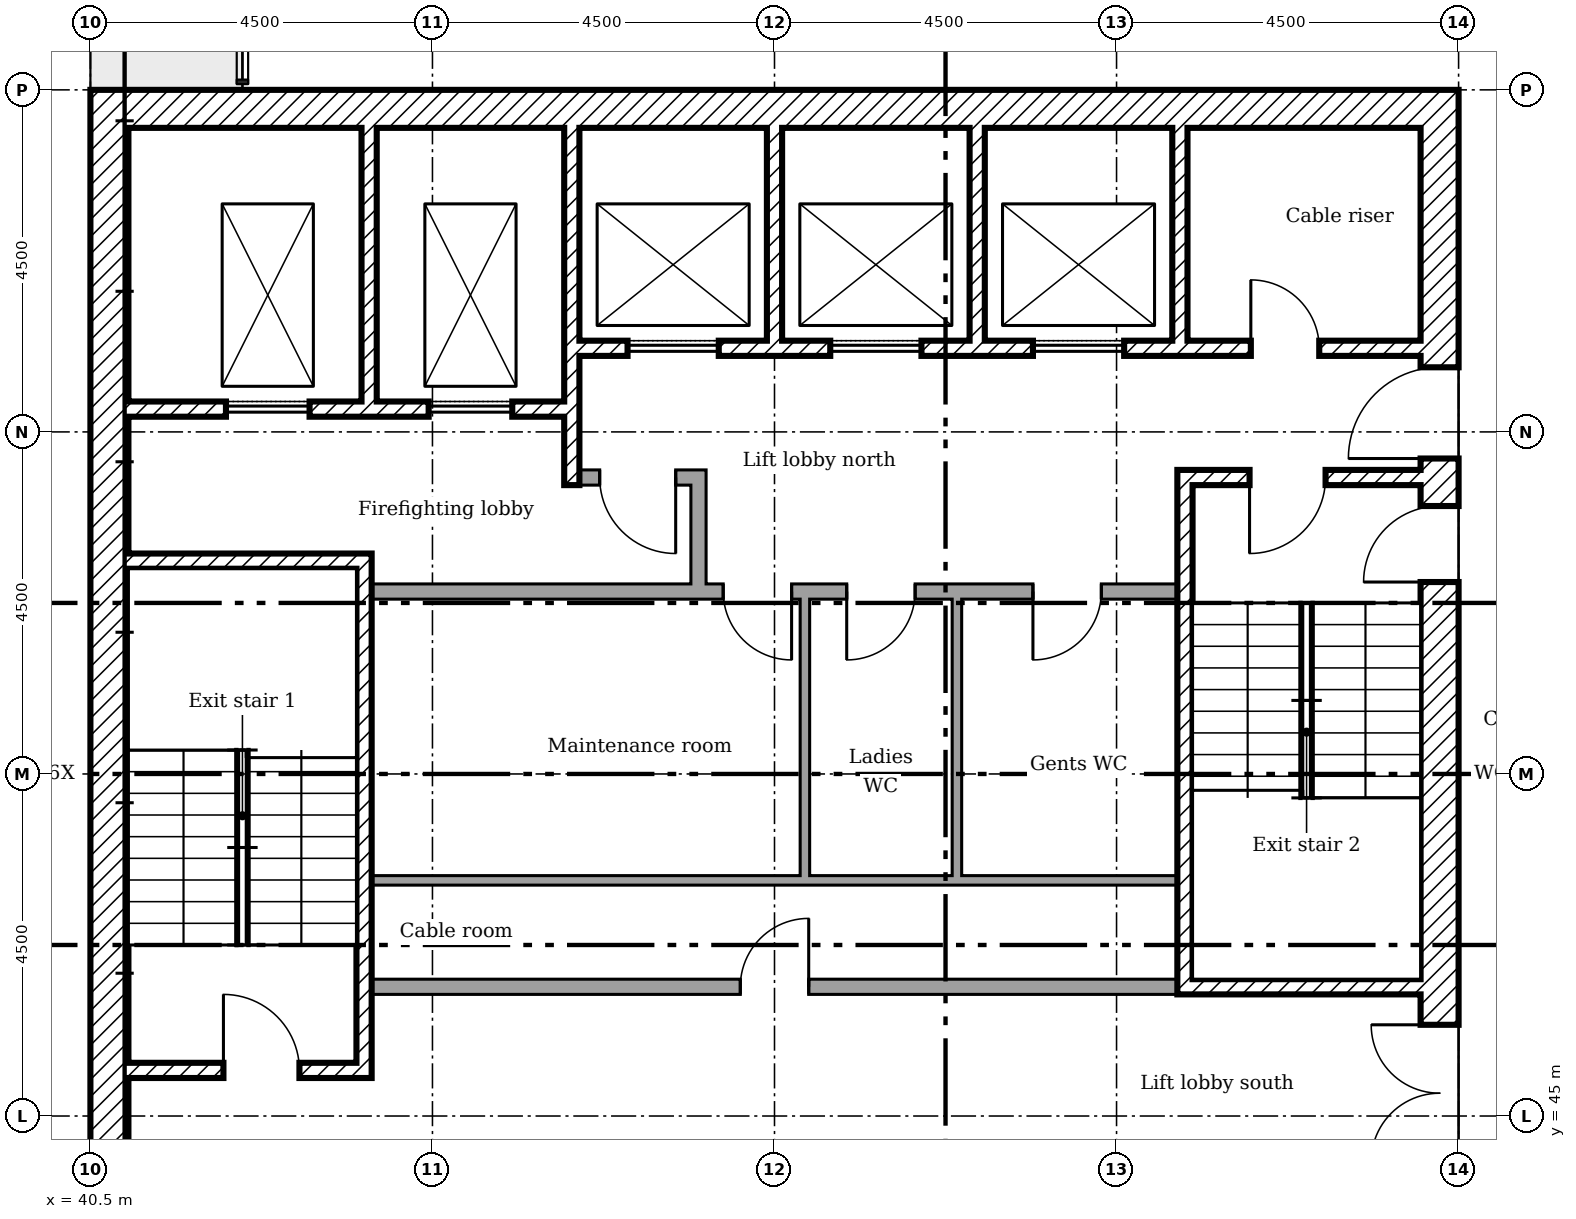
"""IFC4 building model, lengths in metres.
Left out: names, types, materials, properties, quantities, classifications, styles, units other than length and angle.
Written with IfcOpenShell. Run it as: python <this file> out.ifc"""

import sys

from ifc_helpers import new_model, si_unit, direction, frame, frame_2d, origin, place, context, subcontext, project, spatial, rectangle, extrude, element, fill, save


model = new_model("IFC4")
c1 = context("Model", 3, precision=1e-05, world=origin(), true_north=direction((0.0, 1.0)))
c2 = subcontext(c1, "Body", "Model", "MODEL_VIEW")
j1 = project(units=[si_unit("LENGTHUNIT", "METRE"), si_unit("PLANEANGLEUNIT", "RADIAN")], contexts=[c1])
p1 = place(None, origin())
s1 = spatial("IfcSite", under=j1, at=p1, CompositionType="ELEMENT")
p2 = place(p1, origin())
s2 = spatial("IfcBuilding", under=s1, at=p2, CompositionType="ELEMENT")
p3 = place(p2, frame((0.0, 0.0, 242.4)))
s3 = spatial("IfcBuildingStorey", under=s2, at=p3, CompositionType="ELEMENT", Elevation=242.4)
p4 = place(p3, frame((58.25, 40.5, 0.0), z_axis=(0.0, 0.0, 1.0), x_axis=(0.0, 1.0, 0.0)))
e1 = element("IfcWall", 1, at=p4, inside=s3, PredefinedType="SHEAR", context=c2, shape_type="SweptSolid", body=[
    extrude(rectangle(XDim=18.0, YDim=0.5, at=frame_2d((9.0, 0.0))), origin(), (0.0, 0.0, 1.0), 3.3),
])
p5 = place(p4, frame((13.15, 0.0, 0.0)))
e2 = element("IfcOpeningElement", 2, at=p5, cuts=e1, PredefinedType="OPENING", context=c2, shape_type="SweptSolid", body=[
    extrude(rectangle(XDim=1.2, YDim=2.1, at=frame_2d((0.6, 1.05))), frame((0.0, 0.26, 0.0), z_axis=(0.0, -1.0, 0.0), x_axis=(1.0, 0.0, 0.0)), (0.0, 0.0, 1.0), 0.52),
])
p6 = place(p4, frame((3.9, 0.0, 0.0)))
e3 = element("IfcOpeningElement", 3, at=p6, cuts=e1, PredefinedType="OPENING", context=c2, shape_type="SweptSolid", body=[
    extrude(rectangle(XDim=1.8, YDim=2.1, at=frame_2d((0.9, 1.05))), frame((0.0, 0.26, 0.0), z_axis=(0.0, -1.0, 0.0), x_axis=(1.0, 0.0, 0.0)), (0.0, 0.0, 1.0), 0.52),
])
p7 = place(p4, frame((11.525, 0.0, 0.0)))
e4 = element("IfcOpeningElement", 4, at=p7, cuts=e1, PredefinedType="OPENING", context=c2, shape_type="SweptSolid", body=[
    extrude(rectangle(XDim=1.0, YDim=2.1, at=frame_2d((0.5, 1.05))), frame((0.0, 0.26, 0.0), z_axis=(0.0, -1.0, 0.0), x_axis=(1.0, 0.0, 0.0)), (0.0, 0.0, 1.0), 0.52),
])
p8 = place(p3, frame((40.5, 58.25, 0.0)))
e5 = element("IfcWall", 5, at=p8, inside=s3, PredefinedType="SHEAR", context=c2, shape_type="SweptSolid", body=[
    extrude(rectangle(XDim=17.5, YDim=0.5, at=frame_2d((8.75, 0.0))), origin(), (0.0, 0.0, 1.0), 3.3),
])
p9 = place(p3, frame((40.75, 41.0, 0.0), z_axis=(0.0, 0.0, 1.0), x_axis=(0.0, 1.0, 0.0)))
e6 = element("IfcWall", 6, at=p9, inside=s3, PredefinedType="SHEAR", context=c2, shape_type="SweptSolid", body=[
    extrude(rectangle(XDim=17.0, YDim=0.5, at=frame_2d((8.5, 0.0))), origin(), (0.0, 0.0, 1.0), 3.3),
])
p10 = place(p3, frame((44.167, 58.0, 0.0), z_axis=(0.0, 0.0, 1.0), x_axis=(0.0, -1.0, 0.0)))
e7 = element("IfcWall", 7, at=p10, inside=s3, PredefinedType="SHEAR", context=c2, shape_type="SweptSolid", body=[
    extrude(rectangle(XDim=3.6, YDim=0.2, at=frame_2d((1.8, 0.0))), origin(), (0.0, 0.0, 1.0), 3.3),
])
p11 = place(p3, frame((46.833, 58.0, 0.0), z_axis=(0.0, 0.0, 1.0), x_axis=(0.0, -1.0, 0.0)))
e8 = element("IfcWall", 8, at=p11, inside=s3, PredefinedType="SHEAR", context=c2, shape_type="SweptSolid", body=[
    extrude(rectangle(XDim=4.7, YDim=0.2, at=frame_2d((2.35, 0.0))), origin(), (0.0, 0.0, 1.0), 3.3),
])
for number, where, z_axis, x_axis in (
    (9, (49.5, 58.0, 0.0), (0.0, 0.0, 1.0), (0.0, -1.0, 0.0)),
    (10, (52.167, 58.0, 0.0), (0.0, 0.0, 1.0), (0.0, -1.0, 0.0)),
    (11, (54.833, 58.0, 0.0), (0.0, 0.0, 1.0), (0.0, -1.0, 0.0)),
):
    element("IfcWall", number, at=place(p3, frame(where, z_axis=z_axis, x_axis=x_axis)), inside=s3, PredefinedType="SHEAR", context=c2, shape_type="SweptSolid", body=[
        extrude(rectangle(XDim=2.8, YDim=0.2, at=frame_2d((1.4, 0.0))), origin(), (0.0, 0.0, 1.0), 3.3),
    ])
p12 = place(p3, frame((48.5, 51.9, 0.0), z_axis=(0.0, 0.0, 1.0), x_axis=(0.0, 1.0, 0.0)))
e12 = element("IfcWall", 12, at=p12, inside=s3, PredefinedType="PARTITIONING", context=c2, shape_type="SweptSolid", body=[
    extrude(rectangle(XDim=1.6, YDim=0.2, at=frame_2d((0.8, 0.0))), origin(), (0.0, 0.0, 1.0), 3.3),
])
p13 = place(p3, frame((46.933, 53.4, 0.0)))
e13 = element("IfcWall", 13, at=p13, inside=s3, PredefinedType="PARTITIONING", context=c2, shape_type="SweptSolid", body=[
    extrude(rectangle(XDim=1.467, YDim=0.2, at=frame_2d((0.733, 0.0))), origin(), (0.0, 0.0, 1.0), 3.3),
])
p14 = place(p13, frame((0.267, 0.0, 0.0)))
e14 = element("IfcOpeningElement", 14, at=p14, cuts=e13, PredefinedType="OPENING", context=c2, shape_type="SweptSolid", body=[
    extrude(rectangle(XDim=1.0, YDim=2.1, at=frame_2d((0.5, 1.05))), frame((0.0, 0.11, 0.0), z_axis=(0.0, -1.0, 0.0), x_axis=(1.0, 0.0, 0.0)), (0.0, 0.0, 1.0), 0.22),
])
p15 = place(p3, frame((46.933, 55.1, 0.0)))
e15 = element("IfcWall", 15, at=p15, inside=s3, PredefinedType="SHEAR", context=c2, shape_type="SweptSolid", body=[
    extrude(rectangle(XDim=11.067, YDim=0.2, at=frame_2d((5.533, 0.0))), origin(), (0.0, 0.0, 1.0), 3.3),
])
p16 = place(p15, frame((8.833, 0.0, 0.0)))
e16 = element("IfcOpeningElement", 16, at=p16, cuts=e15, PredefinedType="OPENING", context=c2, shape_type="SweptSolid", body=[
    extrude(rectangle(XDim=0.9, YDim=2.1, at=frame_2d((0.45, 1.05))), frame((0.0, 0.11, 0.0), z_axis=(0.0, -1.0, 0.0), x_axis=(1.0, 0.0, 0.0)), (0.0, 0.0, 1.0), 0.22),
])
p17 = place(p15, frame((0.633, 0.0, 0.0)))
e17 = element("IfcOpeningElement", 17, at=p17, cuts=e15, PredefinedType="OPENING", context=c2, shape_type="SweptSolid", body=[
    extrude(rectangle(XDim=1.2, YDim=2.1, at=frame_2d((0.6, 1.05))), frame((0.0, 0.11, 0.0), z_axis=(0.0, -1.0, 0.0), x_axis=(1.0, 0.0, 0.0)), (0.0, 0.0, 1.0), 0.22),
])
p18 = place(p15, frame((3.3, 0.0, 0.0)))
e18 = element("IfcOpeningElement", 18, at=p18, cuts=e15, PredefinedType="OPENING", context=c2, shape_type="SweptSolid", body=[
    extrude(rectangle(XDim=1.2, YDim=2.1, at=frame_2d((0.6, 1.05))), frame((0.0, 0.11, 0.0), z_axis=(0.0, -1.0, 0.0), x_axis=(1.0, 0.0, 0.0)), (0.0, 0.0, 1.0), 0.22),
])
p19 = place(p15, frame((5.967, 0.0, 0.0)))
e19 = element("IfcOpeningElement", 19, at=p19, cuts=e15, PredefinedType="OPENING", context=c2, shape_type="SweptSolid", body=[
    extrude(rectangle(XDim=1.2, YDim=2.1, at=frame_2d((0.6, 1.05))), frame((0.0, 0.11, 0.0), z_axis=(0.0, -1.0, 0.0), x_axis=(1.0, 0.0, 0.0)), (0.0, 0.0, 1.0), 0.22),
])
p20 = place(p3, frame((41.0, 54.3, 0.0)))
e20 = element("IfcWall", 20, at=p20, inside=s3, PredefinedType="SHEAR", context=c2, shape_type="SweptSolid", body=[
    extrude(rectangle(XDim=5.733, YDim=0.2, at=frame_2d((2.867, 0.0))), origin(), (0.0, 0.0, 1.0), 3.3),
])
p21 = place(p20, frame((1.283, 0.0, 0.0)))
e21 = element("IfcOpeningElement", 21, at=p21, cuts=e20, PredefinedType="OPENING", context=c2, shape_type="SweptSolid", body=[
    extrude(rectangle(XDim=1.1, YDim=2.1, at=frame_2d((0.55, 1.05))), frame((0.0, 0.11, 0.0), z_axis=(0.0, -1.0, 0.0), x_axis=(1.0, 0.0, 0.0)), (0.0, 0.0, 1.0), 0.22),
])
p22 = place(p20, frame((3.95, 0.0, 0.0)))
e22 = element("IfcOpeningElement", 22, at=p22, cuts=e20, PredefinedType="OPENING", context=c2, shape_type="SweptSolid", body=[
    extrude(rectangle(XDim=1.1, YDim=2.1, at=frame_2d((0.55, 1.05))), frame((0.0, 0.11, 0.0), z_axis=(0.0, -1.0, 0.0), x_axis=(1.0, 0.0, 0.0)), (0.0, 0.0, 1.0), 0.22),
])
p23 = place(p3, frame((44.1, 45.5, 0.0), z_axis=(0.0, 0.0, 1.0), x_axis=(0.0, 1.0, 0.0)))
e23 = element("IfcWall", 23, at=p23, inside=s3, PredefinedType="SHEAR", context=c2, shape_type="SweptSolid", body=[
    extrude(rectangle(XDim=6.9, YDim=0.2, at=frame_2d((3.45, 0.0))), origin(), (0.0, 0.0, 1.0), 3.3),
])
p24 = place(p3, frame((41.0, 52.3, 0.0)))
e24 = element("IfcWall", 24, at=p24, inside=s3, PredefinedType="SHEAR", context=c2, shape_type="SweptSolid", body=[
    extrude(rectangle(XDim=3.0, YDim=0.2, at=frame_2d((1.5, 0.0))), origin(), (0.0, 0.0, 1.0), 3.3),
])
p25 = place(p3, frame((41.0, 45.6, 0.0)))
e25 = element("IfcWall", 25, at=p25, inside=s3, PredefinedType="SHEAR", context=c2, shape_type="SweptSolid", body=[
    extrude(rectangle(XDim=3.0, YDim=0.2, at=frame_2d((1.5, 0.0))), origin(), (0.0, 0.0, 1.0), 3.3),
])
p26 = place(p25, frame((1.25, 0.0, 0.0)))
e26 = element("IfcOpeningElement", 26, at=p26, cuts=e25, PredefinedType="OPENING", context=c2, shape_type="SweptSolid", body=[
    extrude(rectangle(XDim=1.0, YDim=2.1, at=frame_2d((0.5, 1.05))), frame((0.0, 0.11, 0.0), z_axis=(0.0, -1.0, 0.0), x_axis=(1.0, 0.0, 0.0)), (0.0, 0.0, 1.0), 0.22),
])
p27 = place(p3, frame((54.8, 53.4, 0.0)))
e27 = element("IfcWall", 27, at=p27, inside=s3, PredefinedType="SHEAR", context=c2, shape_type="SweptSolid", body=[
    extrude(rectangle(XDim=3.2, YDim=0.2, at=frame_2d((1.6, 0.0))), origin(), (0.0, 0.0, 1.0), 3.3),
])
p28 = place(p27, frame((0.95, 0.0, 0.0)))
e28 = element("IfcOpeningElement", 28, at=p28, cuts=e27, PredefinedType="OPENING", context=c2, shape_type="SweptSolid", body=[
    extrude(rectangle(XDim=1.0, YDim=2.1, at=frame_2d((0.5, 1.05))), frame((0.0, 0.11, 0.0), z_axis=(0.0, -1.0, 0.0), x_axis=(1.0, 0.0, 0.0)), (0.0, 0.0, 1.0), 0.22),
])
p29 = place(p3, frame((54.8, 46.7, 0.0)))
e29 = element("IfcWall", 29, at=p29, inside=s3, PredefinedType="SHEAR", context=c2, shape_type="SweptSolid", body=[
    extrude(rectangle(XDim=3.2, YDim=0.2, at=frame_2d((1.6, 0.0))), origin(), (0.0, 0.0, 1.0), 3.3),
])
p30 = place(p3, frame((54.9, 46.8, 0.0), z_axis=(0.0, 0.0, 1.0), x_axis=(0.0, 1.0, 0.0)))
e30 = element("IfcWall", 30, at=p30, inside=s3, PredefinedType="SHEAR", context=c2, shape_type="SweptSolid", body=[
    extrude(rectangle(XDim=6.5, YDim=0.2, at=frame_2d((3.25, 0.0))), origin(), (0.0, 0.0, 1.0), 3.3),
])
p31 = place(p3, frame((44.2, 51.9, 0.0)))
e31 = element("IfcWall", 31, at=p31, inside=s3, PredefinedType="PARTITIONING", context=c2, shape_type="SweptSolid", body=[
    extrude(rectangle(XDim=10.6, YDim=0.2, at=frame_2d((5.3, 0.0))), origin(), (0.0, 0.0, 1.0), 3.3),
])
p32 = place(p31, frame((4.625, 0.0, 0.0)))
e32 = element("IfcOpeningElement", 32, at=p32, cuts=e31, PredefinedType="OPENING", context=c2, shape_type="SweptSolid", body=[
    extrude(rectangle(XDim=0.9, YDim=2.1, at=frame_2d((0.45, 1.05))), frame((0.0, 0.11, 0.0), z_axis=(0.0, -1.0, 0.0), x_axis=(1.0, 0.0, 0.0)), (0.0, 0.0, 1.0), 0.22),
])
p33 = place(p31, frame((6.25, 0.0, 0.0)))
e33 = element("IfcOpeningElement", 33, at=p33, cuts=e31, PredefinedType="OPENING", context=c2, shape_type="SweptSolid", body=[
    extrude(rectangle(XDim=0.9, YDim=2.1, at=frame_2d((0.45, 1.05))), frame((0.0, 0.11, 0.0), z_axis=(0.0, -1.0, 0.0), x_axis=(1.0, 0.0, 0.0)), (0.0, 0.0, 1.0), 0.22),
])
p34 = place(p31, frame((8.7, 0.0, 0.0)))
e34 = element("IfcOpeningElement", 34, at=p34, cuts=e31, PredefinedType="OPENING", context=c2, shape_type="SweptSolid", body=[
    extrude(rectangle(XDim=0.9, YDim=2.1, at=frame_2d((0.45, 1.05))), frame((0.0, 0.11, 0.0), z_axis=(0.0, -1.0, 0.0), x_axis=(1.0, 0.0, 0.0)), (0.0, 0.0, 1.0), 0.22),
])
p35 = place(p3, frame((44.2, 46.7, 0.0)))
e35 = element("IfcWall", 35, at=p35, inside=s3, PredefinedType="PARTITIONING", context=c2, shape_type="SweptSolid", body=[
    extrude(rectangle(XDim=10.6, YDim=0.2, at=frame_2d((5.3, 0.0))), origin(), (0.0, 0.0, 1.0), 3.3),
])
p36 = place(p35, frame((4.85, 0.0, 0.0)))
e36 = element("IfcOpeningElement", 36, at=p36, cuts=e35, PredefinedType="OPENING", context=c2, shape_type="SweptSolid", body=[
    extrude(rectangle(XDim=0.9, YDim=2.1, at=frame_2d((0.45, 1.05))), frame((0.0, 0.11, 0.0), z_axis=(0.0, -1.0, 0.0), x_axis=(1.0, 0.0, 0.0)), (0.0, 0.0, 1.0), 0.22),
])
p37 = place(p3, frame((49.962, 48.1, 0.0), z_axis=(0.0, 0.0, 1.0), x_axis=(-1.0, 0.0, 0.0)))
e37 = element("IfcWall", 37, at=p37, inside=s3, PredefinedType="PARTITIONING", context=c2, shape_type="SweptSolid", body=[
    extrude(rectangle(XDim=5.762, YDim=0.125, at=frame_2d((2.881, 0.0))), origin(), (0.0, 0.0, 1.0), 3.3),
])
p38 = place(p3, frame((51.962, 48.1, 0.0), z_axis=(0.0, 0.0, 1.0), x_axis=(-1.0, 0.0, 0.0)))
e38 = element("IfcWall", 38, at=p38, inside=s3, PredefinedType="PARTITIONING", context=c2, shape_type="SweptSolid", body=[
    extrude(rectangle(XDim=2.062, YDim=0.125, at=frame_2d((1.031, 0.0))), origin(), (0.0, 0.0, 1.0), 3.3),
])
p39 = place(p3, frame((49.9, 48.163, 0.0), z_axis=(0.0, 0.0, 1.0), x_axis=(0.0, 1.0, 0.0)))
e39 = element("IfcWall", 39, at=p39, inside=s3, PredefinedType="PARTITIONING", context=c2, shape_type="SweptSolid", body=[
    extrude(rectangle(XDim=3.637, YDim=0.125, at=frame_2d((1.819, 0.0))), origin(), (0.0, 0.0, 1.0), 3.3),
])
p40 = place(p3, frame((54.8, 48.1, 0.0), z_axis=(0.0, 0.0, 1.0), x_axis=(-1.0, 0.0, 0.0)))
e40 = element("IfcWall", 40, at=p40, inside=s3, PredefinedType="PARTITIONING", context=c2, shape_type="SweptSolid", body=[
    extrude(rectangle(XDim=2.9, YDim=0.125, at=frame_2d((1.45, 0.0))), origin(), (0.0, 0.0, 1.0), 3.3),
])
p41 = place(p3, frame((51.9, 48.163, 0.0), z_axis=(0.0, 0.0, 1.0), x_axis=(0.0, 1.0, 0.0)))
e41 = element("IfcWall", 41, at=p41, inside=s3, PredefinedType="PARTITIONING", context=c2, shape_type="SweptSolid", body=[
    extrude(rectangle(XDim=3.637, YDim=0.125, at=frame_2d((1.819, 0.0))), origin(), (0.0, 0.0, 1.0), 3.3),
])
p42 = place(p5, origin())
e42 = element("IfcDoor", 42, at=p42, inside=s3, OperationType="SINGLE_SWING_RIGHT", PredefinedType="DOOR", context=c2, shape_type="SweptSolid", body=[
    extrude(rectangle(XDim=1.2, YDim=2.1, at=frame_2d((0.6, 1.05))), frame((0.0, 0.025, 0.0), z_axis=(0.0, -1.0, 0.0), x_axis=(1.0, 0.0, 0.0)), (0.0, 0.0, 1.0), 0.05),
])
fill(e2, e42)
p43 = place(p6, origin())
e43 = element("IfcDoor", 43, at=p43, inside=s3, OperationType="DOUBLE_DOOR_SINGLE_SWING", PredefinedType="DOOR", context=c2, shape_type="SweptSolid", body=[
    extrude(rectangle(XDim=1.8, YDim=2.1, at=frame_2d((0.9, 1.05))), frame((0.0, 0.025, 0.0), z_axis=(0.0, -1.0, 0.0), x_axis=(1.0, 0.0, 0.0)), (0.0, 0.0, 1.0), 0.05),
])
fill(e3, e43)
p44 = place(p26, origin())
e44 = element("IfcDoor", 44, at=p44, inside=s3, OperationType="SINGLE_SWING_RIGHT", PredefinedType="DOOR", context=c2, shape_type="SweptSolid", body=[
    extrude(rectangle(XDim=1.0, YDim=2.1, at=frame_2d((0.5, 1.05))), frame((0.0, 0.025, 0.0), z_axis=(0.0, -1.0, 0.0), x_axis=(1.0, 0.0, 0.0)), (0.0, 0.0, 1.0), 0.05),
])
fill(e26, e44)
p45 = place(p28, frame((1.0, 0.0, 0.0), x_axis=(-1.0, 0.0, 0.0)))
e45 = element("IfcDoor", 45, at=p45, inside=s3, OperationType="SINGLE_SWING_LEFT", PredefinedType="DOOR", context=c2, shape_type="SweptSolid", body=[
    extrude(rectangle(XDim=1.0, YDim=2.1, at=frame_2d((0.5, 1.05))), frame((0.0, 0.025, 0.0), z_axis=(0.0, -1.0, 0.0), x_axis=(1.0, 0.0, 0.0)), (0.0, 0.0, 1.0), 0.05),
])
fill(e28, e45)
p46 = place(p7, origin())
e46 = element("IfcDoor", 46, at=p46, inside=s3, OperationType="SINGLE_SWING_RIGHT", PredefinedType="DOOR", context=c2, shape_type="SweptSolid", body=[
    extrude(rectangle(XDim=1.0, YDim=2.1, at=frame_2d((0.5, 1.05))), frame((0.0, 0.025, 0.0), z_axis=(0.0, -1.0, 0.0), x_axis=(1.0, 0.0, 0.0)), (0.0, 0.0, 1.0), 0.05),
])
fill(e4, e46)
p47 = place(p14, frame((1.0, 0.0, 0.0), x_axis=(-1.0, 0.0, 0.0)))
e47 = element("IfcDoor", 47, at=p47, inside=s3, OperationType="SINGLE_SWING_RIGHT", PredefinedType="DOOR", context=c2, shape_type="SweptSolid", body=[
    extrude(rectangle(XDim=1.0, YDim=2.1, at=frame_2d((0.5, 1.05))), frame((0.0, 0.025, 0.0), z_axis=(0.0, -1.0, 0.0), x_axis=(1.0, 0.0, 0.0)), (0.0, 0.0, 1.0), 0.05),
])
fill(e14, e47)
p48 = place(p16, origin())
e48 = element("IfcDoor", 48, at=p48, inside=s3, OperationType="SINGLE_SWING_RIGHT", PredefinedType="DOOR", context=c2, shape_type="SweptSolid", body=[
    extrude(rectangle(XDim=0.9, YDim=2.1, at=frame_2d((0.45, 1.05))), frame((0.0, 0.025, 0.0), z_axis=(0.0, -1.0, 0.0), x_axis=(1.0, 0.0, 0.0)), (0.0, 0.0, 1.0), 0.05),
])
fill(e16, e48)
p49 = place(p36, origin())
e49 = element("IfcDoor", 49, at=p49, inside=s3, OperationType="SINGLE_SWING_LEFT", PredefinedType="DOOR", context=c2, shape_type="SweptSolid", body=[
    extrude(rectangle(XDim=0.9, YDim=2.1, at=frame_2d((0.45, 1.05))), frame((0.0, 0.025, 0.0), z_axis=(0.0, -1.0, 0.0), x_axis=(1.0, 0.0, 0.0)), (0.0, 0.0, 1.0), 0.05),
])
fill(e36, e49)
p50 = place(p32, frame((0.9, 0.0, 0.0), x_axis=(-1.0, 0.0, 0.0)))
e50 = element("IfcDoor", 50, at=p50, inside=s3, OperationType="SINGLE_SWING_RIGHT", PredefinedType="DOOR", context=c2, shape_type="SweptSolid", body=[
    extrude(rectangle(XDim=0.9, YDim=2.1, at=frame_2d((0.45, 1.05))), frame((0.0, 0.025, 0.0), z_axis=(0.0, -1.0, 0.0), x_axis=(1.0, 0.0, 0.0)), (0.0, 0.0, 1.0), 0.05),
])
fill(e32, e50)
p51 = place(p33, frame((0.9, 0.0, 0.0), x_axis=(-1.0, 0.0, 0.0)))
e51 = element("IfcDoor", 51, at=p51, inside=s3, OperationType="SINGLE_SWING_LEFT", PredefinedType="DOOR", context=c2, shape_type="SweptSolid", body=[
    extrude(rectangle(XDim=0.9, YDim=2.1, at=frame_2d((0.45, 1.05))), frame((0.0, 0.025, 0.0), z_axis=(0.0, -1.0, 0.0), x_axis=(1.0, 0.0, 0.0)), (0.0, 0.0, 1.0), 0.05),
])
fill(e33, e51)
p52 = place(p34, frame((0.9, 0.0, 0.0), x_axis=(-1.0, 0.0, 0.0)))
e52 = element("IfcDoor", 52, at=p52, inside=s3, OperationType="SINGLE_SWING_LEFT", PredefinedType="DOOR", context=c2, shape_type="SweptSolid", body=[
    extrude(rectangle(XDim=0.9, YDim=2.1, at=frame_2d((0.45, 1.05))), frame((0.0, 0.025, 0.0), z_axis=(0.0, -1.0, 0.0), x_axis=(1.0, 0.0, 0.0)), (0.0, 0.0, 1.0), 0.05),
])
fill(e34, e52)
p53 = place(p21, origin())
e53 = element("IfcDoor", 53, at=p53, inside=s3, OperationType="SLIDING_TO_LEFT", PredefinedType="DOOR", context=c2, shape_type="SweptSolid", body=[
    extrude(rectangle(XDim=1.1, YDim=2.1, at=frame_2d((0.55, 1.05))), frame((0.0, 0.025, 0.0), z_axis=(0.0, -1.0, 0.0), x_axis=(1.0, 0.0, 0.0)), (0.0, 0.0, 1.0), 0.05),
])
fill(e21, e53)
p54 = place(p22, origin())
e54 = element("IfcDoor", 54, at=p54, inside=s3, OperationType="SLIDING_TO_LEFT", PredefinedType="DOOR", context=c2, shape_type="SweptSolid", body=[
    extrude(rectangle(XDim=1.1, YDim=2.1, at=frame_2d((0.55, 1.05))), frame((0.0, 0.025, 0.0), z_axis=(0.0, -1.0, 0.0), x_axis=(1.0, 0.0, 0.0)), (0.0, 0.0, 1.0), 0.05),
])
fill(e22, e54)
p55 = place(p17, origin())
e55 = element("IfcDoor", 55, at=p55, inside=s3, OperationType="SLIDING_TO_LEFT", PredefinedType="DOOR", context=c2, shape_type="SweptSolid", body=[
    extrude(rectangle(XDim=1.2, YDim=2.1, at=frame_2d((0.6, 1.05))), frame((0.0, 0.025, 0.0), z_axis=(0.0, -1.0, 0.0), x_axis=(1.0, 0.0, 0.0)), (0.0, 0.0, 1.0), 0.05),
])
fill(e17, e55)
p56 = place(p18, origin())
e56 = element("IfcDoor", 56, at=p56, inside=s3, OperationType="SLIDING_TO_LEFT", PredefinedType="DOOR", context=c2, shape_type="SweptSolid", body=[
    extrude(rectangle(XDim=1.2, YDim=2.1, at=frame_2d((0.6, 1.05))), frame((0.0, 0.025, 0.0), z_axis=(0.0, -1.0, 0.0), x_axis=(1.0, 0.0, 0.0)), (0.0, 0.0, 1.0), 0.05),
])
fill(e18, e56)
p57 = place(p19, origin())
e57 = element("IfcDoor", 57, at=p57, inside=s3, OperationType="SLIDING_TO_LEFT", PredefinedType="DOOR", context=c2, shape_type="SweptSolid", body=[
    extrude(rectangle(XDim=1.2, YDim=2.1, at=frame_2d((0.6, 1.05))), frame((0.0, 0.025, 0.0), z_axis=(0.0, -1.0, 0.0), x_axis=(1.0, 0.0, 0.0)), (0.0, 0.0, 1.0), 0.05),
])
fill(e19, e57)
save(model, sys.argv[1])
